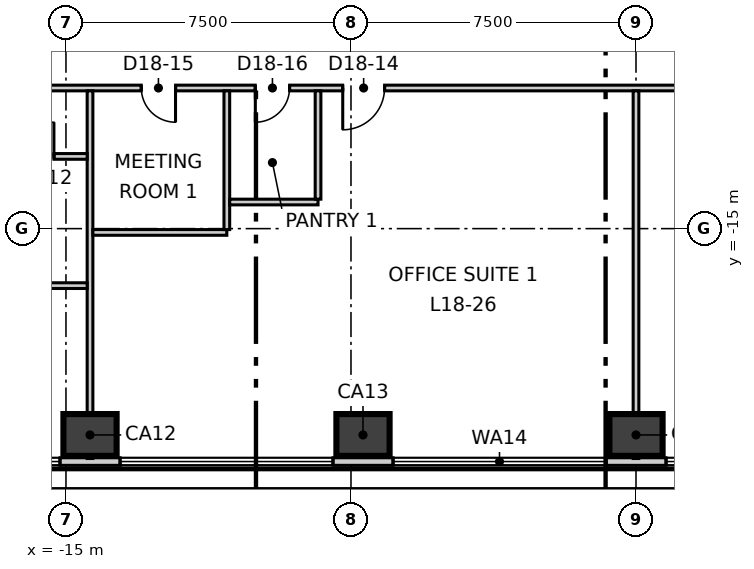
"""IFC4 building model, lengths in metres.
Left out: names, types, materials, properties, quantities, classifications, styles, units other than length and angle.
Written with IfcOpenShell. Run it as: python <this file> out.ifc"""

import sys

from ifc_helpers import new_model, si_unit, direction, frame, frame_2d, origin, origin_2d, place, context, subcontext, project, spatial, rectangle, extrude, element, fill, save


model = new_model("IFC4")
c1 = context("Model", 3, precision=1e-05, world=origin(), true_north=direction((0.0, 1.0)))
c2 = subcontext(c1, "Body", "Model", "MODEL_VIEW")
j1 = project(units=[si_unit("LENGTHUNIT", "METRE"), si_unit("PLANEANGLEUNIT", "RADIAN")], contexts=[c1])
p1 = place(None, origin())
s1 = spatial("IfcSite", under=j1, at=p1, CompositionType="ELEMENT")
p2 = place(p1, origin())
s2 = spatial("IfcBuilding", under=s1, at=p2, CompositionType="ELEMENT")
p3 = place(p2, frame((0.0, 0.0, 83.3)))
s3 = spatial("IfcBuildingStorey", under=s2, at=p3, CompositionType="ELEMENT", Elevation=83.3)
for number, where, z_axis, x_axis in (
    (1, (-14.367, -20.429, -0.3), (0.0, 0.0, 1.0), (1.0, 0.0, 0.0)),
    (2, (-7.184, -20.429, -0.3), (0.0, 0.0, 1.0), (1.0, 0.0, 0.0)),
    (3, (0.0, -20.429, -0.3), (0.0, 0.0, 1.0), (1.0, 0.0, 0.0)),
):
    element("IfcColumn", number, at=place(p3, frame(where, z_axis=z_axis, x_axis=x_axis)), inside=s3, PredefinedType="COLUMN", context=c2, shape_type="SweptSolid", body=[
        extrude(rectangle(XDim=1.4, YDim=1.1, at=origin_2d()), origin(), (0.0, 0.0, 1.0), 4.0),
    ])
p4 = place(p3, frame((-3.28, 36.577, 0.0), z_axis=(0.0, 0.0, 1.0), x_axis=(-0.500001635065, -0.866024459777, 0.0)))
e4 = element("IfcWall", 4, at=p4, inside=s3, PredefinedType="ELEMENTEDWALL", context=c2, shape_type="SweptSolid", body=[
    extrude(rectangle(XDim=60.053, YDim=0.2, at=frame_2d((30.027, 0.0))), origin(), (0.0, 0.0, 1.0), 3.7),
])
p5 = place(p4, frame((2.094, 0.0, 0.9)))
e5 = element("IfcOpeningElement", 5, at=p5, cuts=e4, PredefinedType="OPENING", context=c2, shape_type="SweptSolid", body=[
    extrude(rectangle(XDim=5.6, YDim=2.5, at=frame_2d((2.8, 1.25))), frame((0.0, 0.11, 0.0), z_axis=(0.0, -1.0, 0.0), x_axis=(1.0, 0.0, 0.0)), (0.0, 0.0, 1.0), 0.22),
])
p6 = place(p4, frame((9.278, 0.0, 0.9)))
e6 = element("IfcOpeningElement", 6, at=p6, cuts=e4, PredefinedType="OPENING", context=c2, shape_type="SweptSolid", body=[
    extrude(rectangle(XDim=5.6, YDim=2.5, at=frame_2d((2.8, 1.25))), frame((0.0, 0.11, 0.0), z_axis=(0.0, -1.0, 0.0), x_axis=(1.0, 0.0, 0.0)), (0.0, 0.0, 1.0), 0.22),
])
p7 = place(p4, frame((16.461, 0.0, 0.9)))
e7 = element("IfcOpeningElement", 7, at=p7, cuts=e4, PredefinedType="OPENING", context=c2, shape_type="SweptSolid", body=[
    extrude(rectangle(XDim=5.6, YDim=2.5, at=frame_2d((2.8, 1.25))), frame((0.0, 0.11, 0.0), z_axis=(0.0, -1.0, 0.0), x_axis=(1.0, 0.0, 0.0)), (0.0, 0.0, 1.0), 0.22),
])
p8 = place(p4, frame((23.645, 0.0, 0.9)))
e8 = element("IfcOpeningElement", 8, at=p8, cuts=e4, PredefinedType="OPENING", context=c2, shape_type="SweptSolid", body=[
    extrude(rectangle(XDim=5.6, YDim=2.5, at=frame_2d((2.8, 1.25))), frame((0.0, 0.11, 0.0), z_axis=(0.0, -1.0, 0.0), x_axis=(1.0, 0.0, 0.0)), (0.0, 0.0, 1.0), 0.22),
])
p9 = place(p4, frame((30.828, 0.0, 0.9)))
e9 = element("IfcOpeningElement", 9, at=p9, cuts=e4, PredefinedType="OPENING", context=c2, shape_type="SweptSolid", body=[
    extrude(rectangle(XDim=5.6, YDim=2.5, at=frame_2d((2.8, 1.25))), frame((0.0, 0.11, 0.0), z_axis=(0.0, -1.0, 0.0), x_axis=(1.0, 0.0, 0.0)), (0.0, 0.0, 1.0), 0.22),
])
p10 = place(p4, frame((38.012, 0.0, 0.9)))
e10 = element("IfcOpeningElement", 10, at=p10, cuts=e4, PredefinedType="OPENING", context=c2, shape_type="SweptSolid", body=[
    extrude(rectangle(XDim=5.6, YDim=2.5, at=frame_2d((2.8, 1.25))), frame((0.0, 0.11, 0.0), z_axis=(0.0, -1.0, 0.0), x_axis=(1.0, 0.0, 0.0)), (0.0, 0.0, 1.0), 0.22),
])
p11 = place(p4, frame((45.195, 0.0, 0.9)))
e11 = element("IfcOpeningElement", 11, at=p11, cuts=e4, PredefinedType="OPENING", context=c2, shape_type="SweptSolid", body=[
    extrude(rectangle(XDim=5.6, YDim=2.5, at=frame_2d((2.8, 1.25))), frame((0.0, 0.11, 0.0), z_axis=(0.0, -1.0, 0.0), x_axis=(1.0, 0.0, 0.0)), (0.0, 0.0, 1.0), 0.22),
])
p12 = place(p4, frame((52.379, 0.0, 0.9)))
e12 = element("IfcOpeningElement", 12, at=p12, cuts=e4, PredefinedType="OPENING", context=c2, shape_type="SweptSolid", body=[
    extrude(rectangle(XDim=5.6, YDim=2.5, at=frame_2d((2.8, 1.25))), frame((0.0, 0.11, 0.0), z_axis=(0.0, -1.0, 0.0), x_axis=(1.0, 0.0, 0.0)), (0.0, 0.0, 1.0), 0.22),
])
p13 = place(p3, frame((-30.037, -21.129, 0.0), z_axis=(0.0, 0.0, 1.0), x_axis=(1.0, 0.0, 0.0)))
e13 = element("IfcWall", 13, at=p13, inside=s3, PredefinedType="ELEMENTEDWALL", context=c2, shape_type="SweptSolid", body=[
    extrude(rectangle(XDim=60.054, YDim=0.2, at=frame_2d((30.027, 0.0))), origin(), (0.0, 0.0, 1.0), 3.7),
])
p14 = place(p13, frame((2.095, 0.0, 0.9)))
e14 = element("IfcOpeningElement", 14, at=p14, cuts=e13, PredefinedType="OPENING", context=c2, shape_type="SweptSolid", body=[
    extrude(rectangle(XDim=5.6, YDim=2.5, at=frame_2d((2.8, 1.25))), frame((0.0, 0.11, 0.0), z_axis=(0.0, -1.0, 0.0), x_axis=(1.0, 0.0, 0.0)), (0.0, 0.0, 1.0), 0.22),
])
p15 = place(p13, frame((9.278, 0.0, 0.9)))
e15 = element("IfcOpeningElement", 15, at=p15, cuts=e13, PredefinedType="OPENING", context=c2, shape_type="SweptSolid", body=[
    extrude(rectangle(XDim=5.6, YDim=2.5, at=frame_2d((2.8, 1.25))), frame((0.0, 0.11, 0.0), z_axis=(0.0, -1.0, 0.0), x_axis=(1.0, 0.0, 0.0)), (0.0, 0.0, 1.0), 0.22),
])
p16 = place(p13, frame((16.462, 0.0, 0.9)))
e16 = element("IfcOpeningElement", 16, at=p16, cuts=e13, PredefinedType="OPENING", context=c2, shape_type="SweptSolid", body=[
    extrude(rectangle(XDim=5.6, YDim=2.5, at=frame_2d((2.8, 1.25))), frame((0.0, 0.11, 0.0), z_axis=(0.0, -1.0, 0.0), x_axis=(1.0, 0.0, 0.0)), (0.0, 0.0, 1.0), 0.22),
])
p17 = place(p13, frame((23.645, 0.0, 0.9)))
e17 = element("IfcOpeningElement", 17, at=p17, cuts=e13, PredefinedType="OPENING", context=c2, shape_type="SweptSolid", body=[
    extrude(rectangle(XDim=5.6, YDim=2.5, at=frame_2d((2.8, 1.25))), frame((0.0, 0.11, 0.0), z_axis=(0.0, -1.0, 0.0), x_axis=(1.0, 0.0, 0.0)), (0.0, 0.0, 1.0), 0.22),
])
p18 = place(p13, frame((30.829, 0.0, 0.9)))
e18 = element("IfcOpeningElement", 18, at=p18, cuts=e13, PredefinedType="OPENING", context=c2, shape_type="SweptSolid", body=[
    extrude(rectangle(XDim=5.6, YDim=2.5, at=frame_2d((2.8, 1.25))), frame((0.0, 0.11, 0.0), z_axis=(0.0, -1.0, 0.0), x_axis=(1.0, 0.0, 0.0)), (0.0, 0.0, 1.0), 0.22),
])
p19 = place(p13, frame((38.012, 0.0, 0.9)))
e19 = element("IfcOpeningElement", 19, at=p19, cuts=e13, PredefinedType="OPENING", context=c2, shape_type="SweptSolid", body=[
    extrude(rectangle(XDim=5.6, YDim=2.5, at=frame_2d((2.8, 1.25))), frame((0.0, 0.11, 0.0), z_axis=(0.0, -1.0, 0.0), x_axis=(1.0, 0.0, 0.0)), (0.0, 0.0, 1.0), 0.22),
])
p20 = place(p13, frame((45.196, 0.0, 0.9)))
e20 = element("IfcOpeningElement", 20, at=p20, cuts=e13, PredefinedType="OPENING", context=c2, shape_type="SweptSolid", body=[
    extrude(rectangle(XDim=5.6, YDim=2.5, at=frame_2d((2.8, 1.25))), frame((0.0, 0.11, 0.0), z_axis=(0.0, -1.0, 0.0), x_axis=(1.0, 0.0, 0.0)), (0.0, 0.0, 1.0), 0.22),
])
p21 = place(p13, frame((52.379, 0.0, 0.9)))
e21 = element("IfcOpeningElement", 21, at=p21, cuts=e13, PredefinedType="OPENING", context=c2, shape_type="SweptSolid", body=[
    extrude(rectangle(XDim=5.6, YDim=2.5, at=frame_2d((2.8, 1.25))), frame((0.0, 0.11, 0.0), z_axis=(0.0, -1.0, 0.0), x_axis=(1.0, 0.0, 0.0)), (0.0, 0.0, 1.0), 0.22),
])
p22 = place(p3, frame((-19.497, -11.17, 0.0), z_axis=(0.0, 0.0, 1.0), x_axis=(0.499998854553, 0.866026065108, 0.0)))
e22 = element("IfcWall", 22, at=p22, inside=s3, PredefinedType="PARTITIONING", context=c2, shape_type="SweptSolid", body=[
    extrude(rectangle(XDim=38.994, YDim=0.15, at=frame_2d((19.497, 0.0))), origin(), (0.0, 0.0, 1.0), 3.7),
])
p23 = place(p22, frame((35.844, 0.0, 0.0)))
e23 = element("IfcOpeningElement", 23, at=p23, cuts=e22, PredefinedType="OPENING", context=c2, shape_type="SweptSolid", body=[
    extrude(rectangle(XDim=1.1, YDim=2.1, at=frame_2d((0.55, 1.05))), frame((0.0, 0.085, 0.0), z_axis=(0.0, -1.0, 0.0), x_axis=(1.0, 0.0, 0.0)), (0.0, 0.0, 1.0), 0.17),
])
p24 = place(p22, frame((26.04, 0.0, 0.0)))
e24 = element("IfcOpeningElement", 24, at=p24, cuts=e22, PredefinedType="OPENING", context=c2, shape_type="SweptSolid", body=[
    extrude(rectangle(XDim=1.1, YDim=2.1, at=frame_2d((0.55, 1.05))), frame((0.0, 0.085, 0.0), z_axis=(0.0, -1.0, 0.0), x_axis=(1.0, 0.0, 0.0)), (0.0, 0.0, 1.0), 0.17),
])
p25 = place(p22, frame((7.272, 0.0, 0.0)))
e25 = element("IfcOpeningElement", 25, at=p25, cuts=e22, PredefinedType="OPENING", context=c2, shape_type="SweptSolid", body=[
    extrude(rectangle(XDim=1.1, YDim=2.1, at=frame_2d((0.55, 1.05))), frame((0.0, 0.085, 0.0), z_axis=(0.0, -1.0, 0.0), x_axis=(1.0, 0.0, 0.0)), (0.0, 0.0, 1.0), 0.17),
])
p26 = place(p22, frame((17.372, 0.0, 0.0)))
e26 = element("IfcOpeningElement", 26, at=p26, cuts=e22, PredefinedType="OPENING", context=c2, shape_type="SweptSolid", body=[
    extrude(rectangle(XDim=0.9, YDim=2.1, at=frame_2d((0.45, 1.05))), frame((0.0, 0.085, 0.0), z_axis=(0.0, -1.0, 0.0), x_axis=(1.0, 0.0, 0.0)), (0.0, 0.0, 1.0), 0.17),
])
p27 = place(p22, frame((14.172, 0.0, 0.0)))
e27 = element("IfcOpeningElement", 27, at=p27, cuts=e22, PredefinedType="OPENING", context=c2, shape_type="SweptSolid", body=[
    extrude(rectangle(XDim=0.9, YDim=2.1, at=frame_2d((0.45, 1.05))), frame((0.0, 0.085, 0.0), z_axis=(0.0, -1.0, 0.0), x_axis=(1.0, 0.0, 0.0)), (0.0, 0.0, 1.0), 0.17),
])
p28 = place(p22, frame((11.272, 0.0, 0.0)))
e28 = element("IfcOpeningElement", 28, at=p28, cuts=e22, PredefinedType="OPENING", context=c2, shape_type="SweptSolid", body=[
    extrude(rectangle(XDim=1.0, YDim=2.1, at=frame_2d((0.5, 1.05))), frame((0.0, 0.085, 0.0), z_axis=(0.0, -1.0, 0.0), x_axis=(1.0, 0.0, 0.0)), (0.0, 0.0, 1.0), 0.17),
])
p29 = place(p22, frame((1.904, 0.0, 0.0)))
e29 = element("IfcOpeningElement", 29, at=p29, cuts=e22, PredefinedType="OPENING", context=c2, shape_type="SweptSolid", body=[
    extrude(rectangle(XDim=1.1, YDim=2.1, at=frame_2d((0.55, 1.05))), frame((0.0, 0.085, 0.0), z_axis=(0.0, -1.0, 0.0), x_axis=(1.0, 0.0, 0.0)), (0.0, 0.0, 1.0), 0.17),
])
p30 = place(p3, frame((-19.422, -11.3, 0.0), z_axis=(0.0, 0.0, 1.0), x_axis=(1.0, 0.0, 0.0)))
e30 = element("IfcWall", 30, at=p30, inside=s3, PredefinedType="PARTITIONING", context=c2, shape_type="SweptSolid", body=[
    extrude(rectangle(XDim=38.994, YDim=0.15, at=frame_2d((19.497, 0.0))), origin(), (0.0, 0.0, 1.0), 3.7),
])
p31 = place(p30, frame((1.9, 0.0, 0.0)))
e31 = element("IfcOpeningElement", 31, at=p31, cuts=e30, PredefinedType="OPENING", context=c2, shape_type="SweptSolid", body=[
    extrude(rectangle(XDim=1.1, YDim=2.1, at=frame_2d((0.55, 1.05))), frame((0.0, 0.085, 0.0), z_axis=(0.0, -1.0, 0.0), x_axis=(1.0, 0.0, 0.0)), (0.0, 0.0, 1.0), 0.17),
])
p32 = place(p30, frame((11.705, 0.0, 0.0)))
e32 = element("IfcOpeningElement", 32, at=p32, cuts=e30, PredefinedType="OPENING", context=c2, shape_type="SweptSolid", body=[
    extrude(rectangle(XDim=1.1, YDim=2.1, at=frame_2d((0.55, 1.05))), frame((0.0, 0.085, 0.0), z_axis=(0.0, -1.0, 0.0), x_axis=(1.0, 0.0, 0.0)), (0.0, 0.0, 1.0), 0.17),
])
p33 = place(p30, frame((6.405, 0.0, 0.0)))
e33 = element("IfcOpeningElement", 33, at=p33, cuts=e30, PredefinedType="OPENING", context=c2, shape_type="SweptSolid", body=[
    extrude(rectangle(XDim=0.9, YDim=2.1, at=frame_2d((0.45, 1.05))), frame((0.0, 0.085, 0.0), z_axis=(0.0, -1.0, 0.0), x_axis=(1.0, 0.0, 0.0)), (0.0, 0.0, 1.0), 0.17),
])
p34 = place(p30, frame((9.405, 0.0, 0.0)))
e34 = element("IfcOpeningElement", 34, at=p34, cuts=e30, PredefinedType="OPENING", context=c2, shape_type="SweptSolid", body=[
    extrude(rectangle(XDim=0.9, YDim=2.1, at=frame_2d((0.45, 1.05))), frame((0.0, 0.085, 0.0), z_axis=(0.0, -1.0, 0.0), x_axis=(1.0, 0.0, 0.0)), (0.0, 0.0, 1.0), 0.17),
])
p35 = place(p30, frame((22.472, 0.0, 0.0)))
e35 = element("IfcOpeningElement", 35, at=p35, cuts=e30, PredefinedType="OPENING", context=c2, shape_type="SweptSolid", body=[
    extrude(rectangle(XDim=1.0, YDim=2.1, at=frame_2d((0.5, 1.05))), frame((0.0, 0.085, 0.0), z_axis=(0.0, -1.0, 0.0), x_axis=(1.0, 0.0, 0.0)), (0.0, 0.0, 1.0), 0.17),
])
p36 = place(p30, frame((29.656, 0.0, 0.0)))
e36 = element("IfcOpeningElement", 36, at=p36, cuts=e30, PredefinedType="OPENING", context=c2, shape_type="SweptSolid", body=[
    extrude(rectangle(XDim=1.0, YDim=2.1, at=frame_2d((0.5, 1.05))), frame((0.0, 0.085, 0.0), z_axis=(0.0, -1.0, 0.0), x_axis=(1.0, 0.0, 0.0)), (0.0, 0.0, 1.0), 0.17),
])
p37 = place(p30, frame((35.839, 0.0, 0.0)))
e37 = element("IfcOpeningElement", 37, at=p37, cuts=e30, PredefinedType="OPENING", context=c2, shape_type="SweptSolid", body=[
    extrude(rectangle(XDim=1.1, YDim=2.1, at=frame_2d((0.55, 1.05))), frame((0.0, 0.085, 0.0), z_axis=(0.0, -1.0, 0.0), x_axis=(1.0, 0.0, 0.0)), (0.0, 0.0, 1.0), 0.17),
])
p38 = place(p3, frame((-14.367, -21.049, 0.0), z_axis=(0.0, 0.0, 1.0), x_axis=(0.0, 1.0, 0.0)))
e38 = element("IfcWall", 38, at=p38, inside=s3, PredefinedType="PARTITIONING", context=c2, shape_type="SweptSolid", body=[
    extrude(rectangle(XDim=9.674, YDim=0.15, at=frame_2d((4.837, 0.0))), origin(), (0.0, 0.0, 1.0), 3.7),
])
p39 = place(p3, frame((-14.292, -15.1, 0.0), z_axis=(0.0, 0.0, 1.0), x_axis=(1.0, 0.0, 0.0)))
e39 = element("IfcWall", 39, at=p39, inside=s3, PredefinedType="PARTITIONING", context=c2, shape_type="SweptSolid", body=[
    extrude(rectangle(XDim=3.525, YDim=0.15, at=frame_2d((1.762, 0.0))), origin(), (0.0, 0.0, 1.0), 3.7),
])
p40 = place(p3, frame((-10.767, -15.025, 0.0), z_axis=(0.0, 0.0, 1.0), x_axis=(0.0, 1.0, 0.0)))
e40 = element("IfcWall", 40, at=p40, inside=s3, PredefinedType="PARTITIONING", context=c2, shape_type="SweptSolid", body=[
    extrude(rectangle(XDim=3.65, YDim=0.15, at=frame_2d((1.825, 0.0))), origin(), (0.0, 0.0, 1.0), 3.7),
])
p41 = place(p3, frame((-10.692, -14.3, 0.0), z_axis=(0.0, 0.0, 1.0), x_axis=(1.0, 0.0, 0.0)))
e41 = element("IfcWall", 41, at=p41, inside=s3, PredefinedType="PARTITIONING", context=c2, shape_type="SweptSolid", body=[
    extrude(rectangle(XDim=2.325, YDim=0.15, at=frame_2d((1.163, 0.0))), origin(), (0.0, 0.0, 1.0), 3.7),
])
p42 = place(p3, frame((-8.367, -14.225, 0.0), z_axis=(0.0, 0.0, 1.0), x_axis=(0.0, 1.0, 0.0)))
e42 = element("IfcWall", 42, at=p42, inside=s3, PredefinedType="PARTITIONING", context=c2, shape_type="SweptSolid", body=[
    extrude(rectangle(XDim=2.85, YDim=0.15, at=frame_2d((1.425, 0.0))), origin(), (0.0, 0.0, 1.0), 3.7),
])
p43 = place(p3, frame((0.0, -21.049, 0.0), z_axis=(0.0, 0.0, 1.0), x_axis=(0.0, 1.0, 0.0)))
e43 = element("IfcWall", 43, at=p43, inside=s3, PredefinedType="PARTITIONING", context=c2, shape_type="SweptSolid", body=[
    extrude(rectangle(XDim=9.674, YDim=0.15, at=frame_2d((4.837, 0.0))), origin(), (0.0, 0.0, 1.0), 3.2),
])
p44 = place(p3, frame((0.075, 22.47, 0.0), z_axis=(0.0, 0.0, 1.0), x_axis=(0.500002280369, -0.866024087209, 0.0)))
e44 = element("IfcWall", 44, at=p44, inside=s3, PredefinedType="PARTITIONING", context=c2, shape_type="SweptSolid", body=[
    extrude(rectangle(XDim=38.844, YDim=0.15, at=frame_2d((19.422, 0.0))), origin(), (0.0, 0.0, 1.0), 3.7),
])
p45 = place(p44, frame((35.844, 0.0, 0.0)))
e45 = element("IfcOpeningElement", 45, at=p45, cuts=e44, PredefinedType="OPENING", context=c2, shape_type="SweptSolid", body=[
    extrude(rectangle(XDim=1.1, YDim=2.1, at=frame_2d((0.55, 1.05))), frame((0.0, 0.085, 0.0), z_axis=(0.0, -1.0, 0.0), x_axis=(1.0, 0.0, 0.0)), (0.0, 0.0, 1.0), 0.17),
])
p46 = place(p44, frame((14.44, 0.0, 0.0)))
e46 = element("IfcOpeningElement", 46, at=p46, cuts=e44, PredefinedType="OPENING", context=c2, shape_type="SweptSolid", body=[
    extrude(rectangle(XDim=1.1, YDim=2.1, at=frame_2d((0.55, 1.05))), frame((0.0, 0.085, 0.0), z_axis=(0.0, -1.0, 0.0), x_axis=(1.0, 0.0, 0.0)), (0.0, 0.0, 1.0), 0.17),
])
p47 = place(p44, frame((31.74, 0.0, 0.0)))
e47 = element("IfcOpeningElement", 47, at=p47, cuts=e44, PredefinedType="OPENING", context=c2, shape_type="SweptSolid", body=[
    extrude(rectangle(XDim=0.9, YDim=2.1, at=frame_2d((0.45, 1.05))), frame((0.0, 0.085, 0.0), z_axis=(0.0, -1.0, 0.0), x_axis=(1.0, 0.0, 0.0)), (0.0, 0.0, 1.0), 0.17),
])
p48 = place(p44, frame((28.54, 0.0, 0.0)))
e48 = element("IfcOpeningElement", 48, at=p48, cuts=e44, PredefinedType="OPENING", context=c2, shape_type="SweptSolid", body=[
    extrude(rectangle(XDim=0.9, YDim=2.1, at=frame_2d((0.45, 1.05))), frame((0.0, 0.085, 0.0), z_axis=(0.0, -1.0, 0.0), x_axis=(1.0, 0.0, 0.0)), (0.0, 0.0, 1.0), 0.17),
])
p49 = place(p44, frame((25.74, 0.0, 0.0)))
e49 = element("IfcOpeningElement", 49, at=p49, cuts=e44, PredefinedType="OPENING", context=c2, shape_type="SweptSolid", body=[
    extrude(rectangle(XDim=1.0, YDim=2.1, at=frame_2d((0.5, 1.05))), frame((0.0, 0.085, 0.0), z_axis=(0.0, -1.0, 0.0), x_axis=(1.0, 0.0, 0.0)), (0.0, 0.0, 1.0), 0.17),
])
p50 = place(p44, frame((1.905, 0.0, 0.0)))
e50 = element("IfcOpeningElement", 50, at=p50, cuts=e44, PredefinedType="OPENING", context=c2, shape_type="SweptSolid", body=[
    extrude(rectangle(XDim=1.1, YDim=2.1, at=frame_2d((0.55, 1.05))), frame((0.0, 0.085, 0.0), z_axis=(0.0, -1.0, 0.0), x_axis=(1.0, 0.0, 0.0)), (0.0, 0.0, 1.0), 0.17),
])
p51 = place(p3, frame((-19.967, -16.5, 0.0), z_axis=(0.0, 0.0, 1.0), x_axis=(1.0, 0.0, 0.0)))
e51 = element("IfcWall", 51, at=p51, inside=s3, PredefinedType="PARTITIONING", context=c2, shape_type="SweptSolid", body=[
    extrude(rectangle(XDim=5.525, YDim=0.15, at=frame_2d((2.763, 0.0))), origin(), (0.0, 0.0, 1.0), 3.7),
])
p52 = place(p3, frame((-19.967, -13.1, 0.0), z_axis=(0.0, 0.0, 1.0), x_axis=(1.0, 0.0, 0.0)))
e52 = element("IfcWall", 52, at=p52, inside=s3, PredefinedType="PARTITIONING", context=c2, shape_type="SweptSolid", body=[
    extrude(rectangle(XDim=5.525, YDim=0.15, at=frame_2d((2.763, 0.0))), origin(), (0.0, 0.0, 1.0), 3.7),
])
p53 = place(p52, frame((3.75, 0.0, 0.0)))
e53 = element("IfcOpeningElement", 53, at=p53, cuts=e52, PredefinedType="OPENING", context=c2, shape_type="SweptSolid", body=[
    extrude(rectangle(XDim=0.9, YDim=2.1, at=frame_2d((0.45, 1.05))), frame((0.0, 0.085, 0.0), z_axis=(0.0, -1.0, 0.0), x_axis=(1.0, 0.0, 0.0)), (0.0, 0.0, 1.0), 0.17),
])
p54 = place(p15, origin())
e54 = element("IfcWindow", 54, at=p54, inside=s3, PartitioningType="SINGLE_PANEL", PredefinedType="WINDOW", context=c2, shape_type="SweptSolid", body=[
    extrude(rectangle(XDim=5.6, YDim=2.5, at=frame_2d((2.8, 1.25))), frame((0.0, 0.03, 0.0), z_axis=(0.0, -1.0, 0.0), x_axis=(1.0, 0.0, 0.0)), (0.0, 0.0, 1.0), 0.06),
])
fill(e15, e54)
p55 = place(p16, origin())
e55 = element("IfcWindow", 55, at=p55, inside=s3, PartitioningType="SINGLE_PANEL", PredefinedType="WINDOW", context=c2, shape_type="SweptSolid", body=[
    extrude(rectangle(XDim=5.6, YDim=2.5, at=frame_2d((2.8, 1.25))), frame((0.0, 0.03, 0.0), z_axis=(0.0, -1.0, 0.0), x_axis=(1.0, 0.0, 0.0)), (0.0, 0.0, 1.0), 0.06),
])
fill(e16, e55)
p56 = place(p17, origin())
e56 = element("IfcWindow", 56, at=p56, inside=s3, PartitioningType="SINGLE_PANEL", PredefinedType="WINDOW", context=c2, shape_type="SweptSolid", body=[
    extrude(rectangle(XDim=5.6, YDim=2.5, at=frame_2d((2.8, 1.25))), frame((0.0, 0.03, 0.0), z_axis=(0.0, -1.0, 0.0), x_axis=(1.0, 0.0, 0.0)), (0.0, 0.0, 1.0), 0.06),
])
fill(e17, e56)
p57 = place(p18, origin())
e57 = element("IfcWindow", 57, at=p57, inside=s3, PartitioningType="SINGLE_PANEL", PredefinedType="WINDOW", context=c2, shape_type="SweptSolid", body=[
    extrude(rectangle(XDim=5.6, YDim=2.5, at=frame_2d((2.8, 1.25))), frame((0.0, 0.03, 0.0), z_axis=(0.0, -1.0, 0.0), x_axis=(1.0, 0.0, 0.0)), (0.0, 0.0, 1.0), 0.06),
])
fill(e18, e57)
p58 = place(p53, origin())
e58 = element("IfcDoor", 58, at=p58, inside=s3, OperationType="SINGLE_SWING_LEFT", PredefinedType="DOOR", context=c2, shape_type="SweptSolid", body=[
    extrude(rectangle(XDim=0.9, YDim=2.1, at=frame_2d((0.45, 1.05))), frame((0.0, 0.025, 0.0), z_axis=(0.0, -1.0, 0.0), x_axis=(1.0, 0.0, 0.0)), (0.0, 0.0, 1.0), 0.05),
])
fill(e53, e58)
p59 = place(p32, origin())
e59 = element("IfcDoor", 59, at=p59, inside=s3, OperationType="SINGLE_SWING_LEFT", PredefinedType="DOOR", context=c2, shape_type="SweptSolid", body=[
    extrude(rectangle(XDim=1.1, YDim=2.1, at=frame_2d((0.55, 1.05))), frame((0.0, 0.025, 0.0), z_axis=(0.0, -1.0, 0.0), x_axis=(1.0, 0.0, 0.0)), (0.0, 0.0, 1.0), 0.05),
])
fill(e32, e59)
p60 = place(p33, origin())
e60 = element("IfcDoor", 60, at=p60, inside=s3, OperationType="SINGLE_SWING_RIGHT", PredefinedType="DOOR", context=c2, shape_type="SweptSolid", body=[
    extrude(rectangle(XDim=0.9, YDim=2.1, at=frame_2d((0.45, 1.05))), frame((0.0, 0.025, 0.0), z_axis=(0.0, -1.0, 0.0), x_axis=(1.0, 0.0, 0.0)), (0.0, 0.0, 1.0), 0.05),
])
fill(e33, e60)
p61 = place(p34, origin())
e61 = element("IfcDoor", 61, at=p61, inside=s3, OperationType="SINGLE_SWING_LEFT", PredefinedType="DOOR", context=c2, shape_type="SweptSolid", body=[
    extrude(rectangle(XDim=0.9, YDim=2.1, at=frame_2d((0.45, 1.05))), frame((0.0, 0.025, 0.0), z_axis=(0.0, -1.0, 0.0), x_axis=(1.0, 0.0, 0.0)), (0.0, 0.0, 1.0), 0.05),
])
fill(e34, e61)
save(model, sys.argv[1])
